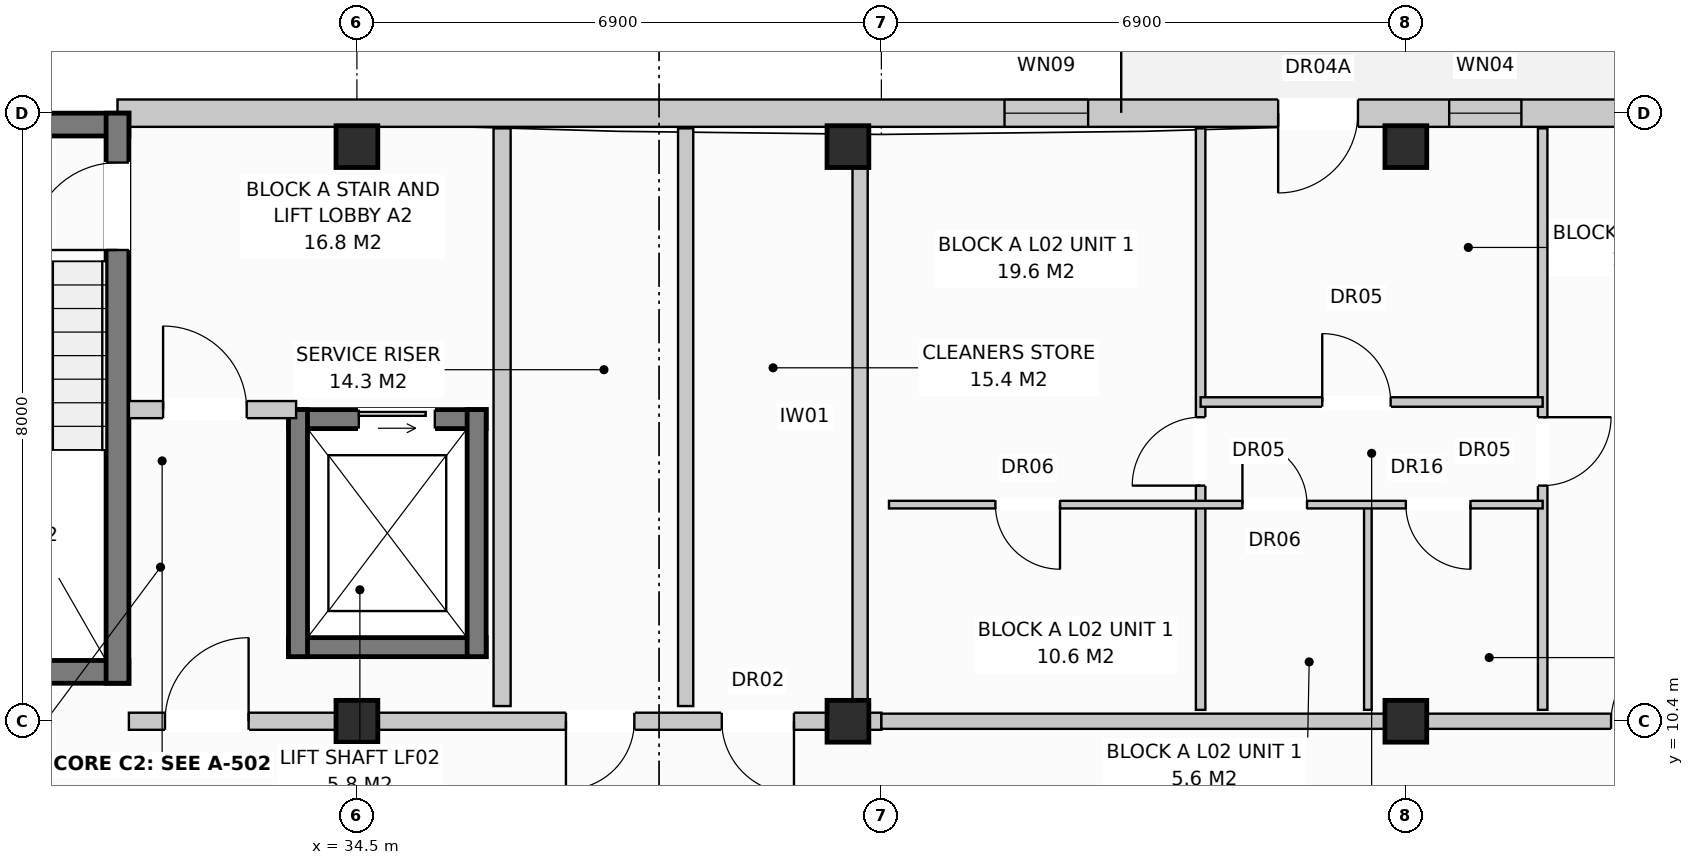
"""IFC4 building model, lengths in metres.
Left out: names, types, materials, properties, quantities, classifications, styles, units other than length and angle.
Written with IfcOpenShell. Run it as: python <this file> out.ifc"""

import sys

from ifc_helpers import new_model, si_unit, direction, frame, frame_2d, origin, origin_with_axes, origin_2d, place, context, subcontext, project, spatial, rectangle, extrude, element, fill, save


model = new_model("IFC4")
c1 = context("Model", 3, precision=1e-05, world=origin(), true_north=direction((0.0, 1.0)))
c2 = subcontext(c1, "Body", "Model", "MODEL_VIEW")
j1 = project(units=[si_unit("LENGTHUNIT", "METRE"), si_unit("PLANEANGLEUNIT", "RADIAN")], contexts=[c1])
p1 = place(None, origin())
s1 = spatial("IfcSite", under=j1, at=p1, CompositionType="ELEMENT")
p2 = place(p1, origin())
s2 = spatial("IfcBuilding", under=s1, at=p2, CompositionType="ELEMENT")
p3 = place(p2, frame((0.0, 0.0, 8.0)))
s3 = spatial("IfcBuildingStorey", under=s2, at=p3, CompositionType="ELEMENT", Elevation=8.0)
for number, where, z_axis, x_axis in (
    (1, (34.5, 10.4, 0.0), (0.0, 0.0, 1.0), (1.0, 0.0, 0.0)),
    (2, (34.5, 17.96, 0.0), (0.0, 0.0, 1.0), (1.0, 0.0, 0.0)),
    (3, (40.96, 10.4, 0.0), (0.0, 0.0, 1.0), (1.0, 0.0, 0.0)),
    (4, (40.96, 17.96, 0.0), (0.0, 0.0, 1.0), (1.0, 0.0, 0.0)),
    (5, (48.3, 10.4, 0.0), (0.0, 0.0, 1.0), (1.0, 0.0, 0.0)),
    (6, (48.3, 17.96, 0.0), (0.0, 0.0, 1.0), (1.0, 0.0, 0.0)),
):
    element("IfcColumn", number, at=place(p3, frame(where, z_axis=z_axis, x_axis=x_axis)), inside=s3, PredefinedType="COLUMN", context=c2, shape_type="SweptSolid", body=[
        extrude(rectangle(XDim=0.55, YDim=0.55, at=origin_2d()), origin(), (0.0, 0.0, 1.0), 3.2),
    ])
p4 = place(p3, frame((31.35, 18.4, 0.0), z_axis=(0.0, 0.0, 1.0), x_axis=(1.0, 0.0, 0.0)))
e7 = element("IfcWall", 7, at=p4, inside=s3, PredefinedType="STANDARD", context=c2, shape_type="SweptSolid", body=[
    extrude(rectangle(XDim=23.68, YDim=0.36, at=frame_2d((11.84, 0.0))), origin(), (0.0, 0.0, 1.0), 2.94),
])
p5 = place(p4, frame((15.27, 0.0, 0.0)))
e8 = element("IfcOpeningElement", 8, at=p5, cuts=e7, PredefinedType="OPENING", context=c2, shape_type="SweptSolid", body=[
    extrude(rectangle(XDim=1.05, YDim=2.12, at=frame_2d((0.525, 1.06))), frame((0.0, 0.192, 0.0), z_axis=(0.0, -1.0, 0.0), x_axis=(1.0, 0.0, 0.0)), (0.0, 0.0, 1.0), 0.384),
])
p6 = place(p4, frame((11.67, 0.0, 0.72)))
e9 = element("IfcOpeningElement", 9, at=p6, cuts=e7, PredefinedType="OPENING", context=c2, shape_type="SweptSolid", body=[
    extrude(rectangle(XDim=1.1, YDim=1.5, at=frame_2d((0.55, 0.75))), frame((0.0, 0.192, 0.0), z_axis=(0.0, -1.0, 0.0), x_axis=(1.0, 0.0, 0.0)), (0.0, 0.0, 1.0), 0.384),
])
p7 = place(p4, frame((17.52, 0.0, 0.9)))
e10 = element("IfcOpeningElement", 10, at=p7, cuts=e7, PredefinedType="OPENING", context=c2, shape_type="SweptSolid", body=[
    extrude(rectangle(XDim=0.95, YDim=1.55, at=frame_2d((0.475, 0.775))), frame((0.0, 0.192, 0.0), z_axis=(0.0, -1.0, 0.0), x_axis=(1.0, 0.0, 0.0)), (0.0, 0.0, 1.0), 0.384),
])
p8 = place(p4, frame((20.67, 0.0, 0.72)))
e11 = element("IfcOpeningElement", 11, at=p8, cuts=e7, PredefinedType="OPENING", context=c2, shape_type="SweptSolid", body=[
    extrude(rectangle(XDim=1.1, YDim=1.5, at=frame_2d((0.55, 0.75))), frame((0.0, 0.192, 0.0), z_axis=(0.0, -1.0, 0.0), x_axis=(1.0, 0.0, 0.0)), (0.0, 0.0, 1.0), 0.384),
])
for number, where, z_axis, x_axis in (
    (12, (27.9, 18.25, 0.0), (0.0, 0.0, 1.0), (1.0, 0.0, 0.0)),
    (13, (27.9, 11.05, 0.0), (0.0, 0.0, 1.0), (1.0, 0.0, 0.0)),
):
    element("IfcWall", number, at=place(p3, frame(where, z_axis=z_axis, x_axis=x_axis)), inside=s3, PredefinedType="SHEAR", context=c2, shape_type="SweptSolid", body=[
        extrude(rectangle(XDim=3.6, YDim=0.3, at=frame_2d((1.8, 0.0))), origin(), (0.0, 0.0, 1.0), 2.94),
    ])
p9 = place(p3, frame((31.35, 10.9, 0.0), z_axis=(0.0, 0.0, 1.0), x_axis=(0.0, 1.0, 0.0)))
e14 = element("IfcWall", 14, at=p9, inside=s3, PredefinedType="SHEAR", context=c2, shape_type="SweptSolid", body=[
    extrude(rectangle(XDim=7.5, YDim=0.3, at=frame_2d((3.75, 0.0))), origin(), (0.0, 0.0, 1.0), 2.94),
])
p10 = place(p9, frame((5.7, 0.0, 0.0)))
e15 = element("IfcOpeningElement", 15, at=p10, cuts=e14, PredefinedType="OPENING", context=c2, shape_type="SweptSolid", body=[
    extrude(rectangle(XDim=1.15, YDim=2.15, at=frame_2d((0.575, 1.075))), frame((0.0, 0.162, 0.0), z_axis=(0.0, -1.0, 0.0), x_axis=(1.0, 0.0, 0.0)), (0.0, 0.0, 1.0), 0.324),
])
p11 = place(p3, frame((33.6, 14.375, 0.0), z_axis=(0.0, 0.0, 1.0), x_axis=(1.0, 0.0, 0.0)))
e16 = element("IfcWall", 16, at=p11, inside=s3, PredefinedType="SHEAR", context=c2, shape_type="SweptSolid", body=[
    extrude(rectangle(XDim=2.6, YDim=0.25, at=frame_2d((1.3, 0.0))), origin(), (0.0, 0.0, 1.0), 2.94),
])
p12 = place(p11, frame((0.925, 0.0, 0.0)))
e17 = element("IfcOpeningElement", 17, at=p12, cuts=e16, PredefinedType="OPENING", context=c2, shape_type="SweptSolid", body=[
    extrude(rectangle(XDim=1.0, YDim=2.1, at=frame_2d((0.5, 1.05))), frame((0.0, 0.137, 0.0), z_axis=(0.0, -1.0, 0.0), x_axis=(1.0, 0.0, 0.0)), (0.0, 0.0, 1.0), 0.274),
])
p13 = place(p3, frame((33.6, 11.375, 0.0), z_axis=(0.0, 0.0, 1.0), x_axis=(1.0, 0.0, 0.0)))
e18 = element("IfcWall", 18, at=p13, inside=s3, PredefinedType="SHEAR", context=c2, shape_type="SweptSolid", body=[
    extrude(rectangle(XDim=2.6, YDim=0.25, at=frame_2d((1.3, 0.0))), origin(), (0.0, 0.0, 1.0), 2.94),
])
for number, where, z_axis, x_axis in (
    (19, (33.725, 11.25, 0.0), (0.0, 0.0, 1.0), (0.0, 1.0, 0.0)),
    (20, (36.075, 11.25, 0.0), (0.0, 0.0, 1.0), (0.0, 1.0, 0.0)),
):
    element("IfcWall", number, at=place(p3, frame(where, z_axis=z_axis, x_axis=x_axis)), inside=s3, PredefinedType="SHEAR", context=c2, shape_type="SweptSolid", body=[
        extrude(rectangle(XDim=3.25, YDim=0.25, at=frame_2d((1.625, 0.0))), origin(), (0.0, 0.0, 1.0), 2.94),
    ])
p14 = place(p3, frame((36.41, 10.6, 0.0), z_axis=(0.0, 0.0, 1.0), x_axis=(0.0, 1.0, 0.0)))
e21 = element("IfcWall", 21, at=p14, inside=s3, PredefinedType="PARTITIONING", context=c2, shape_type="SweptSolid", body=[
    extrude(rectangle(XDim=7.6, YDim=0.225, at=frame_2d((3.8, 0.0))), origin(), (0.0, 0.0, 1.0), 2.59),
])
p15 = place(p3, frame((31.5, 14.5, 0.0), z_axis=(0.0, 0.0, 1.0), x_axis=(1.0, 0.0, 0.0)))
e22 = element("IfcWall", 22, at=p15, inside=s3, PredefinedType="PARTITIONING", context=c2, shape_type="SweptSolid", body=[
    extrude(rectangle(XDim=2.2, YDim=0.225, at=frame_2d((1.1, 0.0))), origin(), (0.0, 0.0, 1.0), 2.94),
])
p16 = place(p15, frame((0.45, 0.0, 0.0)))
e23 = element("IfcOpeningElement", 23, at=p16, cuts=e22, PredefinedType="OPENING", context=c2, shape_type="SweptSolid", body=[
    extrude(rectangle(XDim=1.1, YDim=2.15, at=frame_2d((0.55, 1.075))), frame((0.0, 0.125, 0.0), z_axis=(0.0, -1.0, 0.0), x_axis=(1.0, 0.0, 0.0)), (0.0, 0.0, 1.0), 0.249),
])
for number, where, z_axis, x_axis in (
    (24, (38.825, 10.6, 0.0), (0.0, 0.0, 1.0), (0.0, 1.0, 0.0)),
    (25, (41.12, 10.6, 0.0), (0.0, 0.0, 1.0), (0.0, 1.0, 0.0)),
):
    element("IfcWall", number, at=place(p3, frame(where, z_axis=z_axis, x_axis=x_axis)), inside=s3, PredefinedType="PARTITIONING", context=c2, shape_type="SweptSolid", body=[
        extrude(rectangle(XDim=7.6, YDim=0.2, at=frame_2d((3.8, 0.0))), origin(), (0.0, 0.0, 1.0), 2.94),
    ])
p17 = place(p3, frame((31.5, 10.4, 0.0), z_axis=(0.0, 0.0, 1.0), x_axis=(1.0, 0.0, 0.0)))
e26 = element("IfcWall", 26, at=p17, inside=s3, PredefinedType="PARTITIONING", context=c2, shape_type="SweptSolid", body=[
    extrude(rectangle(XDim=9.9, YDim=0.225, at=frame_2d((4.95, 0.0))), origin(), (0.0, 0.0, 1.0), 2.38),
])
p18 = place(p17, frame((0.475, 0.0, 0.0)))
e27 = element("IfcOpeningElement", 27, at=p18, cuts=e26, PredefinedType="OPENING", context=c2, shape_type="SweptSolid", body=[
    extrude(rectangle(XDim=1.1, YDim=2.15, at=frame_2d((0.55, 1.075))), frame((0.0, 0.125, 0.0), z_axis=(0.0, -1.0, 0.0), x_axis=(1.0, 0.0, 0.0)), (0.0, 0.0, 1.0), 0.249),
])
p19 = place(p17, frame((5.75, 0.0, 0.0)))
e28 = element("IfcOpeningElement", 28, at=p19, cuts=e26, PredefinedType="OPENING", context=c2, shape_type="SweptSolid", body=[
    extrude(rectangle(XDim=0.9, YDim=2.1, at=frame_2d((0.45, 1.05))), frame((0.0, 0.125, 0.0), z_axis=(0.0, -1.0, 0.0), x_axis=(1.0, 0.0, 0.0)), (0.0, 0.0, 1.0), 0.249),
])
p20 = place(p17, frame((7.8, 0.0, 0.0)))
e29 = element("IfcOpeningElement", 29, at=p20, cuts=e26, PredefinedType="OPENING", context=c2, shape_type="SweptSolid", body=[
    extrude(rectangle(XDim=0.95, YDim=2.15, at=frame_2d((0.475, 1.075))), frame((0.0, 0.125, 0.0), z_axis=(0.0, -1.0, 0.0), x_axis=(1.0, 0.0, 0.0)), (0.0, 0.0, 1.0), 0.249),
])
p21 = place(p3, frame((41.4, 10.4, 0.0), z_axis=(0.0, 0.0, 1.0), x_axis=(1.0, 0.0, 0.0)))
e30 = element("IfcWall", 30, at=p21, inside=s3, PredefinedType="PARTITIONING", context=c2, shape_type="SweptSolid", body=[
    extrude(rectangle(XDim=13.8, YDim=0.2, at=frame_2d((6.9, 0.0))), origin(), (0.0, 0.0, 1.0), 2.38),
])
p22 = place(p21, frame((9.6, 0.0, 0.0)))
e31 = element("IfcOpeningElement", 31, at=p22, cuts=e30, PredefinedType="OPENING", context=c2, shape_type="SweptSolid", body=[
    extrude(rectangle(XDim=0.95, YDim=2.15, at=frame_2d((0.475, 1.075))), frame((0.0, 0.112, 0.0), z_axis=(0.0, -1.0, 0.0), x_axis=(1.0, 0.0, 0.0)), (0.0, 0.0, 1.0), 0.224),
])
p23 = place(p3, frame((50.1, 10.55, 0.0), z_axis=(0.0, 0.0, 1.0), x_axis=(0.0, 1.0, 0.0)))
e32 = element("IfcWall", 32, at=p23, inside=s3, PredefinedType="PARTITIONING", context=c2, shape_type="SweptSolid", body=[
    extrude(rectangle(XDim=7.65, YDim=0.125, at=frame_2d((3.825, 0.0))), origin(), (0.0, 0.0, 1.0), 2.94),
])
p24 = place(p23, frame((2.95, 0.0, 0.0)))
e33 = element("IfcOpeningElement", 33, at=p24, cuts=e32, PredefinedType="OPENING", context=c2, shape_type="SweptSolid", body=[
    extrude(rectangle(XDim=0.9, YDim=2.1, at=frame_2d((0.45, 1.05))), frame((0.0, 0.074, 0.0), z_axis=(0.0, -1.0, 0.0), x_axis=(1.0, 0.0, 0.0)), (0.0, 0.0, 1.0), 0.149),
])
p25 = place(p3, frame((45.6, 10.55, 0.0), z_axis=(0.0, 0.0, 1.0), x_axis=(0.0, 1.0, 0.0)))
e34 = element("IfcWall", 34, at=p25, inside=s3, PredefinedType="PARTITIONING", context=c2, shape_type="SweptSolid", body=[
    extrude(rectangle(XDim=7.65, YDim=0.125, at=frame_2d((3.825, 0.0))), origin(), (0.0, 0.0, 1.0), 2.94),
])
p26 = place(p25, frame((2.95, 0.0, 0.0)))
e35 = element("IfcOpeningElement", 35, at=p26, cuts=e34, PredefinedType="OPENING", context=c2, shape_type="SweptSolid", body=[
    extrude(rectangle(XDim=0.9, YDim=2.1, at=frame_2d((0.45, 1.05))), frame((0.0, 0.074, 0.0), z_axis=(0.0, -1.0, 0.0), x_axis=(1.0, 0.0, 0.0)), (0.0, 0.0, 1.0), 0.149),
])
p27 = place(p3, frame((47.8, 10.55, 0.0), z_axis=(0.0, 0.0, 1.0), x_axis=(0.0, 1.0, 0.0)))
e36 = element("IfcWall", 36, at=p27, inside=s3, PredefinedType="PARTITIONING", context=c2, shape_type="SweptSolid", body=[
    extrude(rectangle(XDim=2.7, YDim=0.1, at=frame_2d((1.35, 0.0))), origin(), (0.0, 0.0, 1.0), 2.94),
])
p28 = place(p3, frame((41.5, 13.25, 0.0), z_axis=(0.0, 0.0, 1.0), x_axis=(1.0, 0.0, 0.0)))
e37 = element("IfcWall", 37, at=p28, inside=s3, PredefinedType="PARTITIONING", context=c2, shape_type="SweptSolid", body=[
    extrude(rectangle(XDim=8.6, YDim=0.1, at=frame_2d((4.3, 0.0))), origin(), (0.0, 0.0, 1.0), 2.94),
])
p29 = place(p28, frame((1.4, 0.0, 0.0)))
e38 = element("IfcOpeningElement", 38, at=p29, cuts=e37, PredefinedType="OPENING", context=c2, shape_type="SweptSolid", body=[
    extrude(rectangle(XDim=0.85, YDim=2.05, at=frame_2d((0.425, 1.025))), frame((0.0, 0.062, 0.0), z_axis=(0.0, -1.0, 0.0), x_axis=(1.0, 0.0, 0.0)), (0.0, 0.0, 1.0), 0.124),
])
p30 = place(p28, frame((4.65, 0.0, 0.0)))
e39 = element("IfcOpeningElement", 39, at=p30, cuts=e37, PredefinedType="OPENING", context=c2, shape_type="SweptSolid", body=[
    extrude(rectangle(XDim=0.85, YDim=2.05, at=frame_2d((0.425, 1.025))), frame((0.0, 0.062, 0.0), z_axis=(0.0, -1.0, 0.0), x_axis=(1.0, 0.0, 0.0)), (0.0, 0.0, 1.0), 0.124),
])
p31 = place(p28, frame((6.8, 0.0, 0.0)))
e40 = element("IfcOpeningElement", 40, at=p31, cuts=e37, PredefinedType="OPENING", context=c2, shape_type="SweptSolid", body=[
    extrude(rectangle(XDim=0.85, YDim=2.1, at=frame_2d((0.425, 1.05))), frame((0.0, 0.062, 0.0), z_axis=(0.0, -1.0, 0.0), x_axis=(1.0, 0.0, 0.0)), (0.0, 0.0, 1.0), 0.124),
])
p32 = place(p3, frame((45.6, 14.6, 0.0), z_axis=(0.0, 0.0, 1.0), x_axis=(1.0, 0.0, 0.0)))
e41 = element("IfcWall", 41, at=p32, inside=s3, PredefinedType="PARTITIONING", context=c2, shape_type="SweptSolid", body=[
    extrude(rectangle(XDim=4.5, YDim=0.125, at=frame_2d((2.25, 0.0))), origin(), (0.0, 0.0, 1.0), 2.94),
])
p33 = place(p32, frame((1.6, 0.0, 0.0)))
e42 = element("IfcOpeningElement", 42, at=p33, cuts=e41, PredefinedType="OPENING", context=c2, shape_type="SweptSolid", body=[
    extrude(rectangle(XDim=0.9, YDim=2.1, at=frame_2d((0.45, 1.05))), frame((0.0, 0.074, 0.0), z_axis=(0.0, -1.0, 0.0), x_axis=(1.0, 0.0, 0.0)), (0.0, 0.0, 1.0), 0.149),
])
p34 = place(p5, frame((1.05, 0.0, 0.0), z_axis=(0.0, 0.0, 1.0), x_axis=(-1.0, 0.0, 0.0)))
e43 = element("IfcDoor", 43, at=p34, inside=s3, OperationType="SINGLE_SWING_LEFT", PredefinedType="DOOR", context=c2, shape_type="SweptSolid", body=[
    extrude(rectangle(XDim=1.05, YDim=2.12, at=frame_2d((0.525, 1.06))), frame((0.0, 0.025, 0.0), z_axis=(0.0, -1.0, 0.0), x_axis=(1.0, 0.0, 0.0)), (0.0, 0.0, 1.0), 0.05),
])
fill(e8, e43)
p35 = place(p6, origin_with_axes())
e44 = element("IfcWindow", 44, at=p35, inside=s3, PartitioningType="SINGLE_PANEL", PredefinedType="WINDOW", context=c2, shape_type="SweptSolid", body=[
    extrude(rectangle(XDim=1.1, YDim=1.5, at=frame_2d((0.55, 0.75))), frame((0.0, 0.03, 0.0), z_axis=(0.0, -1.0, 0.0), x_axis=(1.0, 0.0, 0.0)), (0.0, 0.0, 1.0), 0.06),
])
fill(e9, e44)
p36 = place(p7, origin_with_axes())
e45 = element("IfcWindow", 45, at=p36, inside=s3, PartitioningType="SINGLE_PANEL", PredefinedType="WINDOW", context=c2, shape_type="SweptSolid", body=[
    extrude(rectangle(XDim=0.95, YDim=1.55, at=frame_2d((0.475, 0.775))), frame((0.0, 0.03, 0.0), z_axis=(0.0, -1.0, 0.0), x_axis=(1.0, 0.0, 0.0)), (0.0, 0.0, 1.0), 0.06),
])
fill(e10, e45)
p37 = place(p10, origin_with_axes())
e46 = element("IfcDoor", 46, at=p37, inside=s3, OperationType="SINGLE_SWING_LEFT", PredefinedType="DOOR", context=c2, shape_type="SweptSolid", body=[
    extrude(rectangle(XDim=1.15, YDim=2.15, at=frame_2d((0.575, 1.075))), frame((0.0, 0.025, 0.0), z_axis=(0.0, -1.0, 0.0), x_axis=(1.0, 0.0, 0.0)), (0.0, 0.0, 1.0), 0.05),
])
fill(e15, e46)
p38 = place(p12, origin_with_axes())
e47 = element("IfcDoor", 47, at=p38, inside=s3, OperationType="SLIDING_TO_LEFT", PredefinedType="DOOR", context=c2, shape_type="SweptSolid", body=[
    extrude(rectangle(XDim=1.0, YDim=2.1, at=frame_2d((0.5, 1.05))), frame((0.0, 0.025, 0.0), z_axis=(0.0, -1.0, 0.0), x_axis=(1.0, 0.0, 0.0)), (0.0, 0.0, 1.0), 0.05),
])
fill(e17, e47)
p39 = place(p16, origin_with_axes())
e48 = element("IfcDoor", 48, at=p39, inside=s3, OperationType="SINGLE_SWING_LEFT", PredefinedType="DOOR", context=c2, shape_type="SweptSolid", body=[
    extrude(rectangle(XDim=1.1, YDim=2.15, at=frame_2d((0.55, 1.075))), frame((0.0, 0.025, 0.0), z_axis=(0.0, -1.0, 0.0), x_axis=(1.0, 0.0, 0.0)), (0.0, 0.0, 1.0), 0.05),
])
fill(e23, e48)
p40 = place(p18, origin_with_axes())
e49 = element("IfcDoor", 49, at=p40, inside=s3, OperationType="SINGLE_SWING_RIGHT", PredefinedType="DOOR", context=c2, shape_type="SweptSolid", body=[
    extrude(rectangle(XDim=1.1, YDim=2.15, at=frame_2d((0.55, 1.075))), frame((0.0, 0.025, 0.0), z_axis=(0.0, -1.0, 0.0), x_axis=(1.0, 0.0, 0.0)), (0.0, 0.0, 1.0), 0.05),
])
fill(e27, e49)
p41 = place(p19, frame((0.9, 0.0, 0.0), z_axis=(0.0, 0.0, 1.0), x_axis=(-1.0, 0.0, 0.0)))
e50 = element("IfcDoor", 50, at=p41, inside=s3, OperationType="SINGLE_SWING_LEFT", PredefinedType="DOOR", context=c2, shape_type="SweptSolid", body=[
    extrude(rectangle(XDim=0.9, YDim=2.1, at=frame_2d((0.45, 1.05))), frame((0.0, 0.025, 0.0), z_axis=(0.0, -1.0, 0.0), x_axis=(1.0, 0.0, 0.0)), (0.0, 0.0, 1.0), 0.05),
])
fill(e28, e50)
p42 = place(p20, frame((0.95, 0.0, 0.0), z_axis=(0.0, 0.0, 1.0), x_axis=(-1.0, 0.0, 0.0)))
e51 = element("IfcDoor", 51, at=p42, inside=s3, OperationType="SINGLE_SWING_RIGHT", PredefinedType="DOOR", context=c2, shape_type="SweptSolid", body=[
    extrude(rectangle(XDim=0.95, YDim=2.15, at=frame_2d((0.475, 1.075))), frame((0.0, 0.025, 0.0), z_axis=(0.0, -1.0, 0.0), x_axis=(1.0, 0.0, 0.0)), (0.0, 0.0, 1.0), 0.05),
])
fill(e29, e51)
p43 = place(p22, origin_with_axes())
e52 = element("IfcDoor", 52, at=p43, inside=s3, OperationType="SINGLE_SWING_RIGHT", PredefinedType="DOOR", context=c2, shape_type="SweptSolid", body=[
    extrude(rectangle(XDim=0.95, YDim=2.15, at=frame_2d((0.475, 1.075))), frame((0.0, 0.025, 0.0), z_axis=(0.0, -1.0, 0.0), x_axis=(1.0, 0.0, 0.0)), (0.0, 0.0, 1.0), 0.05),
])
fill(e31, e52)
p44 = place(p24, frame((0.9, 0.0, 0.0), z_axis=(0.0, 0.0, 1.0), x_axis=(-1.0, 0.0, 0.0)))
e53 = element("IfcDoor", 53, at=p44, inside=s3, OperationType="SINGLE_SWING_RIGHT", PredefinedType="DOOR", context=c2, shape_type="SweptSolid", body=[
    extrude(rectangle(XDim=0.9, YDim=2.1, at=frame_2d((0.45, 1.05))), frame((0.0, 0.025, 0.0), z_axis=(0.0, -1.0, 0.0), x_axis=(1.0, 0.0, 0.0)), (0.0, 0.0, 1.0), 0.05),
])
fill(e33, e53)
p45 = place(p26, origin_with_axes())
e54 = element("IfcDoor", 54, at=p45, inside=s3, OperationType="SINGLE_SWING_LEFT", PredefinedType="DOOR", context=c2, shape_type="SweptSolid", body=[
    extrude(rectangle(XDim=0.9, YDim=2.1, at=frame_2d((0.45, 1.05))), frame((0.0, 0.025, 0.0), z_axis=(0.0, -1.0, 0.0), x_axis=(1.0, 0.0, 0.0)), (0.0, 0.0, 1.0), 0.05),
])
fill(e35, e54)
p46 = place(p29, frame((0.85, 0.0, 0.0), z_axis=(0.0, 0.0, 1.0), x_axis=(-1.0, 0.0, 0.0)))
e55 = element("IfcDoor", 55, at=p46, inside=s3, OperationType="SINGLE_SWING_RIGHT", PredefinedType="DOOR", context=c2, shape_type="SweptSolid", body=[
    extrude(rectangle(XDim=0.85, YDim=2.05, at=frame_2d((0.425, 1.025))), frame((0.0, 0.025, 0.0), z_axis=(0.0, -1.0, 0.0), x_axis=(1.0, 0.0, 0.0)), (0.0, 0.0, 1.0), 0.05),
])
fill(e38, e55)
p47 = place(p30, origin_with_axes())
e56 = element("IfcDoor", 56, at=p47, inside=s3, OperationType="SINGLE_SWING_LEFT", PredefinedType="DOOR", context=c2, shape_type="SweptSolid", body=[
    extrude(rectangle(XDim=0.85, YDim=2.05, at=frame_2d((0.425, 1.025))), frame((0.0, 0.025, 0.0), z_axis=(0.0, -1.0, 0.0), x_axis=(1.0, 0.0, 0.0)), (0.0, 0.0, 1.0), 0.05),
])
fill(e39, e56)
p48 = place(p31, frame((0.85, 0.0, 0.0), z_axis=(0.0, 0.0, 1.0), x_axis=(-1.0, 0.0, 0.0)))
e57 = element("IfcDoor", 57, at=p48, inside=s3, OperationType="SINGLE_SWING_RIGHT", PredefinedType="DOOR", context=c2, shape_type="SweptSolid", body=[
    extrude(rectangle(XDim=0.85, YDim=2.1, at=frame_2d((0.425, 1.05))), frame((0.0, 0.025, 0.0), z_axis=(0.0, -1.0, 0.0), x_axis=(1.0, 0.0, 0.0)), (0.0, 0.0, 1.0), 0.05),
])
fill(e40, e57)
p49 = place(p33, origin_with_axes())
e58 = element("IfcDoor", 58, at=p49, inside=s3, OperationType="SINGLE_SWING_LEFT", PredefinedType="DOOR", context=c2, shape_type="SweptSolid", body=[
    extrude(rectangle(XDim=0.9, YDim=2.1, at=frame_2d((0.45, 1.05))), frame((0.0, 0.025, 0.0), z_axis=(0.0, -1.0, 0.0), x_axis=(1.0, 0.0, 0.0)), (0.0, 0.0, 1.0), 0.05),
])
fill(e42, e58)
save(model, sys.argv[1])
